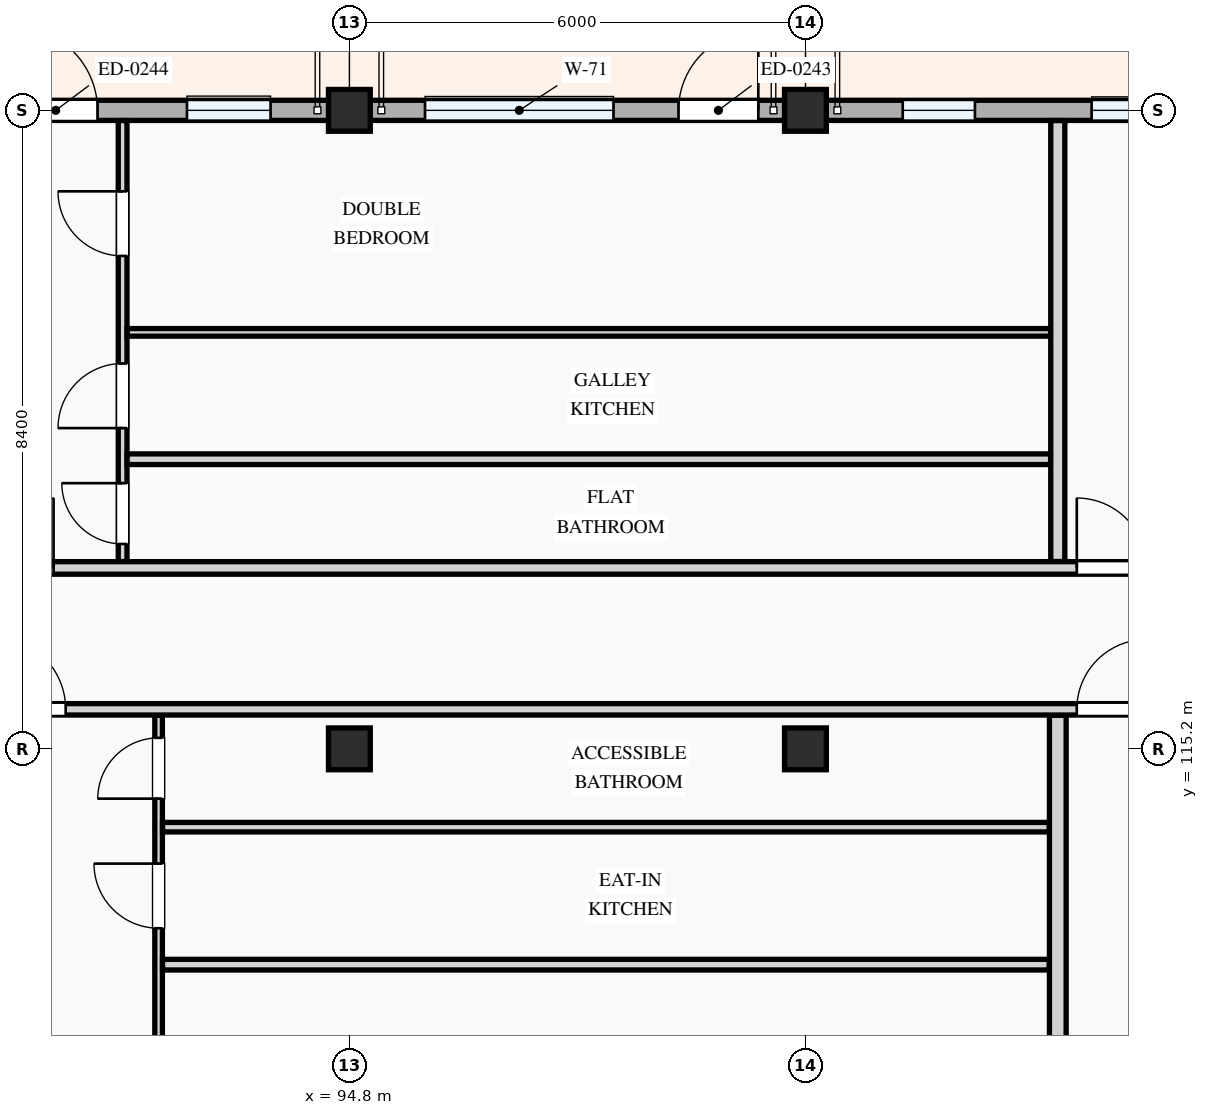
"""IFC4 building model, lengths in metres.
Left out: names, types, materials, properties, quantities, classifications, styles, units other than length and angle.
Written with IfcOpenShell. Run it as: python <this file> out.ifc"""

import sys

from ifc_helpers import new_model, si_unit, direction, frame, frame_2d, origin, origin_2d, place, context, subcontext, project, spatial, rectangle, extrude, element, fill, save


model = new_model("IFC4")
c1 = context("Model", 3, precision=1e-05, world=origin(), true_north=direction((0.0, 1.0)))
c2 = subcontext(c1, "Body", "Model", "MODEL_VIEW")
j1 = project(units=[si_unit("LENGTHUNIT", "METRE"), si_unit("PLANEANGLEUNIT", "RADIAN")], contexts=[c1])
p1 = place(None, origin())
s1 = spatial("IfcSite", under=j1, at=p1, CompositionType="ELEMENT")
p2 = place(p1, origin())
s2 = spatial("IfcBuilding", under=s1, at=p2, CompositionType="ELEMENT")
p3 = place(p2, frame((0.0, 0.0, 31.2)))
s3 = spatial("IfcBuildingStorey", under=s2, at=p3, CompositionType="ELEMENT", Elevation=31.2)
for number, where, z_axis, x_axis in (
    (1, (94.8, 115.2, 0.0), (0.0, 0.0, 1.0), (1.0, 0.0, 0.0)),
    (2, (94.8, 123.6, 0.0), (0.0, 0.0, 1.0), (1.0, 0.0, 0.0)),
    (3, (100.8, 115.2, 0.0), (0.0, 0.0, 1.0), (1.0, 0.0, 0.0)),
    (4, (100.8, 123.6, 0.0), (0.0, 0.0, 1.0), (1.0, 0.0, 0.0)),
):
    element("IfcColumn", number, at=place(p3, frame(where, z_axis=z_axis, x_axis=x_axis)), inside=s3, PredefinedType="COLUMN", context=c2, shape_type="SweptSolid", body=[
        extrude(rectangle(XDim=0.55, YDim=0.55, at=origin_2d()), origin(), (0.0, 0.0, 1.0), 3.3),
    ])
p4 = place(p3, frame((109.2, 123.6, 0.0), z_axis=(0.0, 0.0, 1.0), x_axis=(-1.0, 0.0, 0.0)))
e5 = element("IfcWall", 5, at=p4, inside=s3, PredefinedType="STANDARD", context=c2, shape_type="SweptSolid", body=[
    extrude(rectangle(XDim=8.4, YDim=0.265, at=frame_2d((4.2, 0.0))), origin(), (0.0, 0.0, 1.0), 2.375),
])
p5 = place(p4, frame((0.62, 0.0, 0.0)))
e6 = element("IfcOpeningElement", 6, at=p5, cuts=e5, PredefinedType="OPENING", context=c2, shape_type="SweptSolid", body=[
    extrude(rectangle(XDim=1.6, YDim=2.2, at=frame_2d((0.8, 1.1))), frame((0.0, 0.143, 0.0), z_axis=(0.0, -1.0, 0.0), x_axis=(1.0, 0.0, 0.0)), (0.0, 0.0, 1.0), 0.285),
])
p6 = place(p4, frame((2.715, 0.0, 0.78)))
e7 = element("IfcOpeningElement", 7, at=p6, cuts=e5, PredefinedType="OPENING", context=c2, shape_type="SweptSolid", body=[
    extrude(rectangle(XDim=1.92, YDim=1.44, at=frame_2d((0.96, 0.72))), frame((0.0, 0.143, 0.0), z_axis=(0.0, -1.0, 0.0), x_axis=(1.0, 0.0, 0.0)), (0.0, 0.0, 1.0), 0.285),
])
p7 = place(p4, frame((6.17, 0.0, 0.78)))
e8 = element("IfcOpeningElement", 8, at=p7, cuts=e5, PredefinedType="OPENING", context=c2, shape_type="SweptSolid", body=[
    extrude(rectangle(XDim=0.95, YDim=1.15, at=frame_2d((0.475, 0.575))), frame((0.0, 0.143, 0.0), z_axis=(0.0, -1.0, 0.0), x_axis=(1.0, 0.0, 0.0)), (0.0, 0.0, 1.0), 0.285),
])
p8 = place(p3, frame((100.8, 123.6, 0.0), z_axis=(0.0, 0.0, 1.0), x_axis=(-1.0, 0.0, 0.0)))
e9 = element("IfcWall", 9, at=p8, inside=s3, PredefinedType="STANDARD", context=c2, shape_type="SweptSolid", body=[
    extrude(rectangle(XDim=6.0, YDim=0.265, at=frame_2d((3.0, 0.0))), origin(), (0.0, 0.0, 1.0), 2.525),
])
p9 = place(p8, frame((0.62, 0.0, 0.0)))
e10 = element("IfcOpeningElement", 10, at=p9, cuts=e9, PredefinedType="OPENING", context=c2, shape_type="SweptSolid", body=[
    extrude(rectangle(XDim=1.05, YDim=2.15, at=frame_2d((0.525, 1.075))), frame((0.0, 0.143, 0.0), z_axis=(0.0, -1.0, 0.0), x_axis=(1.0, 0.0, 0.0)), (0.0, 0.0, 1.0), 0.285),
])
p10 = place(p8, frame((2.525, 0.0, 0.78)))
e11 = element("IfcOpeningElement", 11, at=p10, cuts=e9, PredefinedType="OPENING", context=c2, shape_type="SweptSolid", body=[
    extrude(rectangle(XDim=2.48, YDim=1.46, at=frame_2d((1.24, 0.73))), frame((0.0, 0.143, 0.0), z_axis=(0.0, -1.0, 0.0), x_axis=(1.0, 0.0, 0.0)), (0.0, 0.0, 1.0), 0.285),
])
p11 = place(p3, frame((94.8, 123.6, 0.0), z_axis=(0.0, 0.0, 1.0), x_axis=(-1.0, 0.0, 0.0)))
e12 = element("IfcWall", 12, at=p11, inside=s3, PredefinedType="STANDARD", context=c2, shape_type="SweptSolid", body=[
    extrude(rectangle(XDim=8.4, YDim=0.265, at=frame_2d((4.2, 0.0))), origin(), (0.0, 0.0, 1.0), 2.375),
])
p12 = place(p11, frame((3.313, 0.0, 0.0)))
e13 = element("IfcOpeningElement", 13, at=p12, cuts=e12, PredefinedType="OPENING", context=c2, shape_type="SweptSolid", body=[
    extrude(rectangle(XDim=1.1, YDim=2.15, at=frame_2d((0.55, 1.075))), frame((0.0, 0.143, 0.0), z_axis=(0.0, -1.0, 0.0), x_axis=(1.0, 0.0, 0.0)), (0.0, 0.0, 1.0), 0.285),
])
p13 = place(p11, frame((1.037, 0.0, 0.78)))
e14 = element("IfcOpeningElement", 14, at=p13, cuts=e12, PredefinedType="OPENING", context=c2, shape_type="SweptSolid", body=[
    extrude(rectangle(XDim=1.1, YDim=1.3, at=frame_2d((0.55, 0.65))), frame((0.0, 0.143, 0.0), z_axis=(0.0, -1.0, 0.0), x_axis=(1.0, 0.0, 0.0)), (0.0, 0.0, 1.0), 0.285),
])
p14 = place(p11, frame((5.562, 0.0, 0.78)))
e15 = element("IfcOpeningElement", 15, at=p14, cuts=e12, PredefinedType="OPENING", context=c2, shape_type="SweptSolid", body=[
    extrude(rectangle(XDim=1.55, YDim=1.4, at=frame_2d((0.775, 0.7))), frame((0.0, 0.143, 0.0), z_axis=(0.0, -1.0, 0.0), x_axis=(1.0, 0.0, 0.0)), (0.0, 0.0, 1.0), 0.285),
])
p15 = place(p3, frame((92.29, 109.26, 0.0), z_axis=(0.0, 0.0, 1.0), x_axis=(0.0, 1.0, 0.0)))
e16 = element("IfcWall", 16, at=p15, inside=s3, PredefinedType="PARTITIONING", context=c2, shape_type="SweptSolid", body=[
    extrude(rectangle(XDim=6.383, YDim=0.1, at=frame_2d((3.191, 0.0))), origin(), (0.0, 0.0, 1.0), 3.0),
])
p16 = place(p15, frame((1.125, 0.0, 0.0)))
e17 = element("IfcOpeningElement", 17, at=p16, cuts=e16, PredefinedType="OPENING", context=c2, shape_type="SweptSolid", body=[
    extrude(rectangle(XDim=0.85, YDim=2.1, at=frame_2d((0.425, 1.05))), frame((0.0, 0.06, 0.0), z_axis=(0.0, -1.0, 0.0), x_axis=(1.0, 0.0, 0.0)), (0.0, 0.0, 1.0), 0.12),
])
p17 = place(p15, frame((3.58, 0.0, 0.0)))
e18 = element("IfcOpeningElement", 18, at=p17, cuts=e16, PredefinedType="OPENING", context=c2, shape_type="SweptSolid", body=[
    extrude(rectangle(XDim=0.85, YDim=2.1, at=frame_2d((0.425, 1.05))), frame((0.0, 0.06, 0.0), z_axis=(0.0, -1.0, 0.0), x_axis=(1.0, 0.0, 0.0)), (0.0, 0.0, 1.0), 0.12),
])
p18 = place(p15, frame((5.285, 0.0, 0.0)))
e19 = element("IfcOpeningElement", 19, at=p18, cuts=e16, PredefinedType="OPENING", context=c2, shape_type="SweptSolid", body=[
    extrude(rectangle(XDim=0.8, YDim=2.1, at=frame_2d((0.4, 1.05))), frame((0.0, 0.06, 0.0), z_axis=(0.0, -1.0, 0.0), x_axis=(1.0, 0.0, 0.0)), (0.0, 0.0, 1.0), 0.12),
])
p19 = place(p3, frame((92.342, 112.361, 0.0), z_axis=(0.0, 0.0, 1.0), x_axis=(1.0, 0.0, 0.0)))
e20 = element("IfcWall", 20, at=p19, inside=s3, PredefinedType="PARTITIONING", context=c2, shape_type="SweptSolid", body=[
    extrude(rectangle(XDim=11.666, YDim=0.14, at=frame_2d((5.833, 0.0))), origin(), (0.0, 0.0, 1.0), 3.0),
])
p20 = place(p3, frame((92.342, 114.17, 0.0), z_axis=(0.0, 0.0, 1.0), x_axis=(1.0, 0.0, 0.0)))
e21 = element("IfcWall", 21, at=p20, inside=s3, PredefinedType="PARTITIONING", context=c2, shape_type="SweptSolid", body=[
    extrude(rectangle(XDim=11.666, YDim=0.125, at=frame_2d((5.833, 0.0))), origin(), (0.0, 0.0, 1.0), 3.0),
])
p21 = place(p3, frame((91.817, 117.665, 0.0), z_axis=(0.0, 0.0, 1.0), x_axis=(0.0, 1.0, 0.0)))
e22 = element("IfcWall", 22, at=p21, inside=s3, PredefinedType="PARTITIONING", context=c2, shape_type="SweptSolid", body=[
    extrude(rectangle(XDim=5.801, YDim=0.115, at=frame_2d((2.9, 0.0))), origin(), (0.0, 0.0, 1.0), 3.0),
])
p22 = place(p21, frame((0.231, 0.0, 0.0)))
e23 = element("IfcOpeningElement", 23, at=p22, cuts=e22, PredefinedType="OPENING", context=c2, shape_type="SweptSolid", body=[
    extrude(rectangle(XDim=0.8, YDim=2.1, at=frame_2d((0.4, 1.05))), frame((0.0, 0.067, 0.0), z_axis=(0.0, -1.0, 0.0), x_axis=(1.0, 0.0, 0.0)), (0.0, 0.0, 1.0), 0.135),
])
p23 = place(p21, frame((1.755, 0.0, 0.0)))
e24 = element("IfcOpeningElement", 24, at=p23, cuts=e22, PredefinedType="OPENING", context=c2, shape_type="SweptSolid", body=[
    extrude(rectangle(XDim=0.85, YDim=2.1, at=frame_2d((0.425, 1.05))), frame((0.0, 0.067, 0.0), z_axis=(0.0, -1.0, 0.0), x_axis=(1.0, 0.0, 0.0)), (0.0, 0.0, 1.0), 0.135),
])
p24 = place(p21, frame((4.02, 0.0, 0.0)))
e25 = element("IfcOpeningElement", 25, at=p24, cuts=e22, PredefinedType="OPENING", context=c2, shape_type="SweptSolid", body=[
    extrude(rectangle(XDim=0.85, YDim=2.1, at=frame_2d((0.425, 1.05))), frame((0.0, 0.067, 0.0), z_axis=(0.0, -1.0, 0.0), x_axis=(1.0, 0.0, 0.0)), (0.0, 0.0, 1.0), 0.135),
])
p25 = place(p3, frame((91.876, 120.679, 0.0), z_axis=(0.0, 0.0, 1.0), x_axis=(1.0, 0.0, 0.0)))
e26 = element("IfcWall", 26, at=p25, inside=s3, PredefinedType="PARTITIONING", context=c2, shape_type="SweptSolid", body=[
    extrude(rectangle(XDim=12.149, YDim=0.1, at=frame_2d((6.075, 0.0))), origin(), (0.0, 0.0, 1.0), 3.0),
])
p26 = place(p3, frame((91.876, 119.01, 0.0), z_axis=(0.0, 0.0, 1.0), x_axis=(1.0, 0.0, 0.0)))
e27 = element("IfcWall", 27, at=p26, inside=s3, PredefinedType="PARTITIONING", context=c2, shape_type="SweptSolid", body=[
    extrude(rectangle(XDim=12.149, YDim=0.14, at=frame_2d((6.075, 0.0))), origin(), (0.0, 0.0, 1.0), 3.0),
])
p27 = place(p3, frame((104.12, 109.334, 0.0), z_axis=(0.0, 0.0, 1.0), x_axis=(0.0, 1.0, 0.0)))
e28 = element("IfcWall", 28, at=p27, inside=s3, PredefinedType="PARTITIONING", context=c2, shape_type="SweptSolid", body=[
    extrude(rectangle(XDim=6.309, YDim=0.22, at=frame_2d((3.154, 0.0))), origin(), (0.0, 0.0, 1.0), 3.0),
])
p28 = place(p3, frame((104.12, 117.665, 0.0), z_axis=(0.0, 0.0, 1.0), x_axis=(0.0, 1.0, 0.0)))
e29 = element("IfcWall", 29, at=p28, inside=s3, PredefinedType="PARTITIONING", context=c2, shape_type="SweptSolid", body=[
    extrude(rectangle(XDim=5.801, YDim=0.185, at=frame_2d((2.9, 0.0))), origin(), (0.0, 0.0, 1.0), 3.0),
])
p29 = place(p3, frame((80.534, 115.72, 0.0), z_axis=(0.0, 0.0, 1.0), x_axis=(1.0, 0.0, 0.0)))
e30 = element("IfcWall", 30, at=p29, inside=s3, PredefinedType="PARTITIONING", context=c2, shape_type="SweptSolid", body=[
    extrude(rectangle(XDim=69.516, YDim=0.15, at=frame_2d((34.758, 0.0))), origin(), (0.0, 0.0, 1.0), 3.0),
])
p30 = place(p29, frame((9.573, 0.0, 0.0)))
e31 = element("IfcOpeningElement", 31, at=p30, cuts=e30, PredefinedType="OPENING", context=c2, shape_type="SweptSolid", body=[
    extrude(rectangle(XDim=0.96, YDim=2.12, at=frame_2d((0.48, 1.06))), frame((0.0, 0.085, 0.0), z_axis=(0.0, -1.0, 0.0), x_axis=(1.0, 0.0, 0.0)), (0.0, 0.0, 1.0), 0.17),
])
p31 = place(p29, frame((23.835, 0.0, 0.0)))
e32 = element("IfcOpeningElement", 32, at=p31, cuts=e30, PredefinedType="OPENING", context=c2, shape_type="SweptSolid", body=[
    extrude(rectangle(XDim=0.92, YDim=2.1, at=frame_2d((0.46, 1.05))), frame((0.0, 0.085, 0.0), z_axis=(0.0, -1.0, 0.0), x_axis=(1.0, 0.0, 0.0)), (0.0, 0.0, 1.0), 0.17),
])
p32 = place(p29, frame((52.783, 0.0, 0.0)))
e33 = element("IfcOpeningElement", 33, at=p32, cuts=e30, PredefinedType="OPENING", context=c2, shape_type="SweptSolid", body=[
    extrude(rectangle(XDim=0.92, YDim=2.1, at=frame_2d((0.46, 1.05))), frame((0.0, 0.085, 0.0), z_axis=(0.0, -1.0, 0.0), x_axis=(1.0, 0.0, 0.0)), (0.0, 0.0, 1.0), 0.17),
])
p33 = place(p3, frame((80.534, 117.58, 0.0), z_axis=(0.0, 0.0, 1.0), x_axis=(1.0, 0.0, 0.0)))
e34 = element("IfcWall", 34, at=p33, inside=s3, PredefinedType="PARTITIONING", context=c2, shape_type="SweptSolid", body=[
    extrude(rectangle(XDim=72.006, YDim=0.165, at=frame_2d((36.003, 0.0))), origin(), (0.0, 0.0, 1.0), 3.0),
])
p34 = place(p33, frame((9.454, 0.0, 0.0)))
e35 = element("IfcOpeningElement", 35, at=p34, cuts=e34, PredefinedType="OPENING", context=c2, shape_type="SweptSolid", body=[
    extrude(rectangle(XDim=0.92, YDim=2.1, at=frame_2d((0.46, 1.05))), frame((0.0, 0.093, 0.0), z_axis=(0.0, -1.0, 0.0), x_axis=(1.0, 0.0, 0.0)), (0.0, 0.0, 1.0), 0.185),
])
p35 = place(p33, frame((23.835, 0.0, 0.0)))
e36 = element("IfcOpeningElement", 36, at=p35, cuts=e34, PredefinedType="OPENING", context=c2, shape_type="SweptSolid", body=[
    extrude(rectangle(XDim=0.92, YDim=2.1, at=frame_2d((0.46, 1.05))), frame((0.0, 0.093, 0.0), z_axis=(0.0, -1.0, 0.0), x_axis=(1.0, 0.0, 0.0)), (0.0, 0.0, 1.0), 0.185),
])
p36 = place(p33, frame((52.76, 0.0, 0.0)))
e37 = element("IfcOpeningElement", 37, at=p36, cuts=e34, PredefinedType="OPENING", context=c2, shape_type="SweptSolid", body=[
    extrude(rectangle(XDim=0.96, YDim=2.12, at=frame_2d((0.48, 1.06))), frame((0.0, 0.093, 0.0), z_axis=(0.0, -1.0, 0.0), x_axis=(1.0, 0.0, 0.0)), (0.0, 0.0, 1.0), 0.185),
])
p37 = place(p6, origin())
e38 = element("IfcWindow", 38, at=p37, inside=s3, PartitioningType="DOUBLE_PANEL_VERTICAL", PredefinedType="WINDOW", context=c2, shape_type="SweptSolid", body=[
    extrude(rectangle(XDim=1.92, YDim=1.44, at=frame_2d((0.96, 0.72))), frame((0.0, 0.03, 0.0), z_axis=(0.0, -1.0, 0.0), x_axis=(1.0, 0.0, 0.0)), (0.0, 0.0, 1.0), 0.06),
])
fill(e7, e38)
p38 = place(p7, origin())
e39 = element("IfcWindow", 39, at=p38, inside=s3, PartitioningType="SINGLE_PANEL", PredefinedType="WINDOW", context=c2, shape_type="SweptSolid", body=[
    extrude(rectangle(XDim=0.95, YDim=1.15, at=frame_2d((0.475, 0.575))), frame((0.0, 0.03, 0.0), z_axis=(0.0, -1.0, 0.0), x_axis=(1.0, 0.0, 0.0)), (0.0, 0.0, 1.0), 0.06),
])
fill(e8, e39)
p39 = place(p9, frame((1.05, 0.0, 0.0), z_axis=(0.0, 0.0, 1.0), x_axis=(-1.0, 0.0, 0.0)))
e40 = element("IfcDoor", 40, at=p39, inside=s3, OperationType="SINGLE_SWING_RIGHT", PredefinedType="DOOR", context=c2, shape_type="SweptSolid", body=[
    extrude(rectangle(XDim=1.05, YDim=2.15, at=frame_2d((0.525, 1.075))), frame((0.0, 0.025, 0.0), z_axis=(0.0, -1.0, 0.0), x_axis=(1.0, 0.0, 0.0)), (0.0, 0.0, 1.0), 0.05),
])
fill(e10, e40)
p40 = place(p10, origin())
e41 = element("IfcWindow", 41, at=p40, inside=s3, PartitioningType="DOUBLE_PANEL_VERTICAL", PredefinedType="WINDOW", context=c2, shape_type="SweptSolid", body=[
    extrude(rectangle(XDim=2.48, YDim=1.46, at=frame_2d((1.24, 0.73))), frame((0.0, 0.03, 0.0), z_axis=(0.0, -1.0, 0.0), x_axis=(1.0, 0.0, 0.0)), (0.0, 0.0, 1.0), 0.06),
])
fill(e11, e41)
p41 = place(p12, frame((1.1, 0.0, 0.0), z_axis=(0.0, 0.0, 1.0), x_axis=(-1.0, 0.0, 0.0)))
e42 = element("IfcDoor", 42, at=p41, inside=s3, OperationType="SINGLE_SWING_LEFT", PredefinedType="DOOR", context=c2, shape_type="SweptSolid", body=[
    extrude(rectangle(XDim=1.1, YDim=2.15, at=frame_2d((0.55, 1.075))), frame((0.0, 0.025, 0.0), z_axis=(0.0, -1.0, 0.0), x_axis=(1.0, 0.0, 0.0)), (0.0, 0.0, 1.0), 0.05),
])
fill(e13, e42)
p42 = place(p13, origin())
e43 = element("IfcWindow", 43, at=p42, inside=s3, PartitioningType="SINGLE_PANEL", PredefinedType="WINDOW", context=c2, shape_type="SweptSolid", body=[
    extrude(rectangle(XDim=1.1, YDim=1.3, at=frame_2d((0.55, 0.65))), frame((0.0, 0.03, 0.0), z_axis=(0.0, -1.0, 0.0), x_axis=(1.0, 0.0, 0.0)), (0.0, 0.0, 1.0), 0.06),
])
fill(e14, e43)
p43 = place(p17, origin())
e44 = element("IfcDoor", 44, at=p43, inside=s3, OperationType="SINGLE_SWING_RIGHT", PredefinedType="DOOR", context=c2, shape_type="SweptSolid", body=[
    extrude(rectangle(XDim=0.85, YDim=2.1, at=frame_2d((0.425, 1.05))), frame((0.0, 0.025, 0.0), z_axis=(0.0, -1.0, 0.0), x_axis=(1.0, 0.0, 0.0)), (0.0, 0.0, 1.0), 0.05),
])
fill(e18, e44)
p44 = place(p18, origin())
e45 = element("IfcDoor", 45, at=p44, inside=s3, OperationType="SINGLE_SWING_LEFT", PredefinedType="DOOR", context=c2, shape_type="SweptSolid", body=[
    extrude(rectangle(XDim=0.8, YDim=2.1, at=frame_2d((0.4, 1.05))), frame((0.0, 0.025, 0.0), z_axis=(0.0, -1.0, 0.0), x_axis=(1.0, 0.0, 0.0)), (0.0, 0.0, 1.0), 0.05),
])
fill(e19, e45)
p45 = place(p22, origin())
e46 = element("IfcDoor", 46, at=p45, inside=s3, OperationType="SINGLE_SWING_RIGHT", PredefinedType="DOOR", context=c2, shape_type="SweptSolid", body=[
    extrude(rectangle(XDim=0.8, YDim=2.1, at=frame_2d((0.4, 1.05))), frame((0.0, 0.025, 0.0), z_axis=(0.0, -1.0, 0.0), x_axis=(1.0, 0.0, 0.0)), (0.0, 0.0, 1.0), 0.05),
])
fill(e23, e46)
p46 = place(p23, origin())
e47 = element("IfcDoor", 47, at=p46, inside=s3, OperationType="SINGLE_SWING_LEFT", PredefinedType="DOOR", context=c2, shape_type="SweptSolid", body=[
    extrude(rectangle(XDim=0.85, YDim=2.1, at=frame_2d((0.425, 1.05))), frame((0.0, 0.025, 0.0), z_axis=(0.0, -1.0, 0.0), x_axis=(1.0, 0.0, 0.0)), (0.0, 0.0, 1.0), 0.05),
])
fill(e24, e47)
p47 = place(p24, origin())
e48 = element("IfcDoor", 48, at=p47, inside=s3, OperationType="SINGLE_SWING_RIGHT", PredefinedType="DOOR", context=c2, shape_type="SweptSolid", body=[
    extrude(rectangle(XDim=0.85, YDim=2.1, at=frame_2d((0.425, 1.05))), frame((0.0, 0.025, 0.0), z_axis=(0.0, -1.0, 0.0), x_axis=(1.0, 0.0, 0.0)), (0.0, 0.0, 1.0), 0.05),
])
fill(e25, e48)
p48 = place(p30, origin())
e49 = element("IfcDoor", 49, at=p48, inside=s3, OperationType="SINGLE_SWING_LEFT", PredefinedType="DOOR", context=c2, shape_type="SweptSolid", body=[
    extrude(rectangle(XDim=0.96, YDim=2.12, at=frame_2d((0.48, 1.06))), frame((0.0, 0.025, 0.0), z_axis=(0.0, -1.0, 0.0), x_axis=(1.0, 0.0, 0.0)), (0.0, 0.0, 1.0), 0.05),
])
fill(e31, e49)
p49 = place(p31, origin())
e50 = element("IfcDoor", 50, at=p49, inside=s3, OperationType="SINGLE_SWING_RIGHT", PredefinedType="DOOR", context=c2, shape_type="SweptSolid", body=[
    extrude(rectangle(XDim=0.92, YDim=2.1, at=frame_2d((0.46, 1.05))), frame((0.0, 0.025, 0.0), z_axis=(0.0, -1.0, 0.0), x_axis=(1.0, 0.0, 0.0)), (0.0, 0.0, 1.0), 0.05),
])
fill(e32, e50)
p50 = place(p34, origin())
e51 = element("IfcDoor", 51, at=p50, inside=s3, OperationType="SINGLE_SWING_RIGHT", PredefinedType="DOOR", context=c2, shape_type="SweptSolid", body=[
    extrude(rectangle(XDim=0.92, YDim=2.1, at=frame_2d((0.46, 1.05))), frame((0.0, 0.025, 0.0), z_axis=(0.0, -1.0, 0.0), x_axis=(1.0, 0.0, 0.0)), (0.0, 0.0, 1.0), 0.05),
])
fill(e35, e51)
p51 = place(p35, origin())
e52 = element("IfcDoor", 52, at=p51, inside=s3, OperationType="SINGLE_SWING_LEFT", PredefinedType="DOOR", context=c2, shape_type="SweptSolid", body=[
    extrude(rectangle(XDim=0.92, YDim=2.1, at=frame_2d((0.46, 1.05))), frame((0.0, 0.025, 0.0), z_axis=(0.0, -1.0, 0.0), x_axis=(1.0, 0.0, 0.0)), (0.0, 0.0, 1.0), 0.05),
])
fill(e36, e52)
save(model, sys.argv[1])
